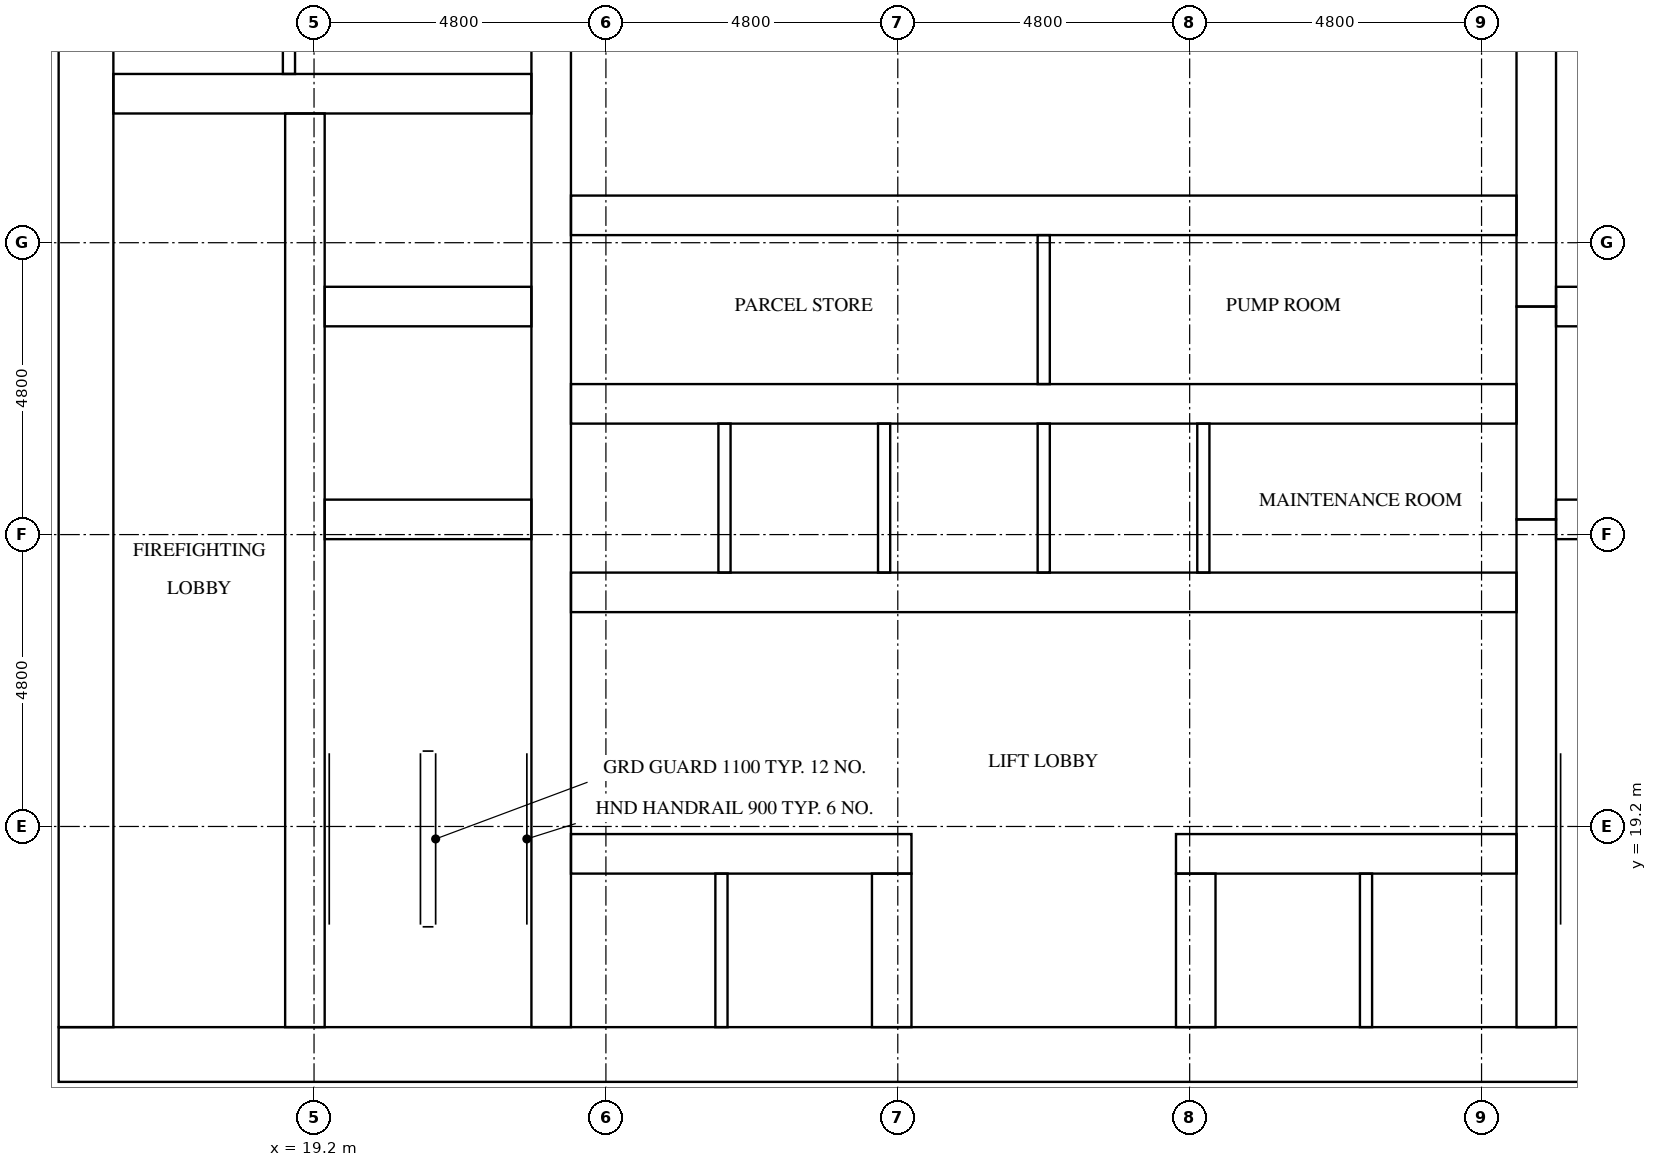
"""IFC4 building model, lengths in metres.
Left out: names, types, materials, properties, quantities, classifications, styles, units other than length and angle.
Written with IfcOpenShell. Run it as: python <this file> out.ifc"""

import sys

from ifc_helpers import new_model, si_unit, direction, frame, frame_2d, origin, place, context, subcontext, project, spatial, rectangle, extrude, element, fill, save


model = new_model("IFC4")
c1 = context("Model", 3, precision=1e-05, world=origin(), true_north=direction((0.0, 1.0)))
c2 = subcontext(c1, "Body", "Model", "MODEL_VIEW")
j1 = project(units=[si_unit("LENGTHUNIT", "METRE"), si_unit("PLANEANGLEUNIT", "RADIAN")], contexts=[c1])
p1 = place(None, origin())
s1 = spatial("IfcSite", under=j1, at=p1, CompositionType="ELEMENT")
p2 = place(p1, origin())
s2 = spatial("IfcBuilding", under=s1, at=p2, CompositionType="ELEMENT")
p3 = place(p2, frame((0.0, 0.0, 62.8)))
s3 = spatial("IfcBuildingStorey", under=s2, at=p3, CompositionType="ELEMENT", Elevation=62.8)
p4 = place(p3, frame((15.0, 15.45, 0.0), z_axis=(0.0, 0.0, 1.0), x_axis=(1.0, 0.0, 0.0)))
e1 = element("IfcWall", 1, at=p4, inside=s3, PredefinedType="SHEAR", context=c2, shape_type="SweptSolid", body=[
    extrude(rectangle(XDim=32.4, YDim=0.9, at=frame_2d((16.2, 0.0))), origin(), (0.0, 0.0, 1.0), 3.2),
])
p5 = place(p4, frame((15.3, 0.0, 0.0)))
e2 = element("IfcOpeningElement", 2, at=p5, cuts=e1, PredefinedType="OPENING", context=c2, shape_type="SweptSolid", body=[
    extrude(rectangle(XDim=1.8, YDim=2.1, at=frame_2d((0.9, 1.05))), frame((0.0, 0.46, 0.0), z_axis=(0.0, -1.0, 0.0), x_axis=(1.0, 0.0, 0.0)), (0.0, 0.0, 1.0), 0.92),
])
p6 = place(p3, frame((15.45, 15.9, 0.0), z_axis=(0.0, 0.0, 1.0), x_axis=(0.0, 1.0, 0.0)))
e3 = element("IfcWall", 3, at=p6, inside=s3, PredefinedType="SHEAR", context=c2, shape_type="SweptSolid", body=[
    extrude(rectangle(XDim=21.0, YDim=0.9, at=frame_2d((10.5, 0.0))), origin(), (0.0, 0.0, 1.0), 3.2),
])
p7 = place(p6, frame((4.86, 0.0, 0.0)))
e4 = element("IfcOpeningElement", 4, at=p7, cuts=e3, PredefinedType="OPENING", context=c2, shape_type="SweptSolid", body=[
    extrude(rectangle(XDim=1.2, YDim=2.1, at=frame_2d((0.6, 1.05))), frame((0.0, 0.46, 0.0), z_axis=(0.0, -1.0, 0.0), x_axis=(1.0, 0.0, 0.0)), (0.0, 0.0, 1.0), 0.92),
])
p8 = place(p3, frame((19.05, 15.9, 0.0), z_axis=(0.0, 0.0, 1.0), x_axis=(0.0, 1.0, 0.0)))
e5 = element("IfcWall", 5, at=p8, inside=s3, PredefinedType="SHEAR", context=c2, shape_type="SweptSolid", body=[
    extrude(rectangle(XDim=15.025, YDim=0.65, at=frame_2d((7.513, 0.0))), origin(), (0.0, 0.0, 1.0), 3.2),
])
p9 = place(p8, frame((9.55, 0.0, 0.0)))
e6 = element("IfcOpeningElement", 6, at=p9, cuts=e5, PredefinedType="OPENING", context=c2, shape_type="SweptSolid", body=[
    extrude(rectangle(XDim=1.1, YDim=2.1, at=frame_2d((0.55, 1.05))), frame((0.0, 0.335, 0.0), z_axis=(0.0, -1.0, 0.0), x_axis=(1.0, 0.0, 0.0)), (0.0, 0.0, 1.0), 0.67),
])
p10 = place(p8, frame((13.05, 0.0, 0.0)))
e7 = element("IfcOpeningElement", 7, at=p10, cuts=e5, PredefinedType="OPENING", context=c2, shape_type="SweptSolid", body=[
    extrude(rectangle(XDim=1.1, YDim=2.1, at=frame_2d((0.55, 1.05))), frame((0.0, 0.335, 0.0), z_axis=(0.0, -1.0, 0.0), x_axis=(1.0, 0.0, 0.0)), (0.0, 0.0, 1.0), 0.67),
])
p11 = place(p8, frame((0.3, 0.0, 0.0)))
e8 = element("IfcOpeningElement", 8, at=p11, cuts=e5, PredefinedType="OPENING", context=c2, shape_type="SweptSolid", body=[
    extrude(rectangle(XDim=1.2, YDim=2.1, at=frame_2d((0.6, 1.05))), frame((0.0, 0.335, 0.0), z_axis=(0.0, -1.0, 0.0), x_axis=(1.0, 0.0, 0.0)), (0.0, 0.0, 1.0), 0.67),
])
p12 = place(p3, frame((23.1, 15.9, 0.0), z_axis=(0.0, 0.0, 1.0), x_axis=(0.0, 1.0, 0.0)))
e9 = element("IfcWall", 9, at=p12, inside=s3, PredefinedType="SHEAR", context=c2, shape_type="SweptSolid", body=[
    extrude(rectangle(XDim=21.0, YDim=0.65, at=frame_2d((10.5, 0.0))), origin(), (0.0, 0.0, 1.0), 3.2),
])
p13 = place(p3, frame((39.3, 15.9, 0.0), z_axis=(0.0, 0.0, 1.0), x_axis=(0.0, 1.0, 0.0)))
e10 = element("IfcWall", 10, at=p13, inside=s3, PredefinedType="SHEAR", context=c2, shape_type="SweptSolid", body=[
    extrude(rectangle(XDim=8.35, YDim=0.65, at=frame_2d((4.175, 0.0))), origin(), (0.0, 0.0, 1.0), 3.2),
])
p14 = place(p3, frame((39.3, 24.25, 0.0), z_axis=(0.0, 0.0, 1.0), x_axis=(0.0, 1.0, 0.0)))
e11 = element("IfcWall", 11, at=p14, inside=s3, PredefinedType="SHEAR", context=c2, shape_type="SweptSolid", body=[
    extrude(rectangle(XDim=3.5, YDim=0.65, at=frame_2d((1.75, 0.0))), origin(), (0.0, 0.0, 1.0), 3.2),
])
p15 = place(p3, frame((39.3, 27.75, 0.0), z_axis=(0.0, 0.0, 1.0), x_axis=(0.0, 1.0, 0.0)))
e12 = element("IfcWall", 12, at=p15, inside=s3, PredefinedType="SHEAR", context=c2, shape_type="SweptSolid", body=[
    extrude(rectangle(XDim=9.15, YDim=0.65, at=frame_2d((4.575, 0.0))), origin(), (0.0, 0.0, 1.0), 3.2),
])
for number, where, z_axis, x_axis in (
    (13, (19.375, 24.25, 0.0), (0.0, 0.0, 1.0), (1.0, 0.0, 0.0)),
    (14, (19.375, 27.75, 0.0), (0.0, 0.0, 1.0), (1.0, 0.0, 0.0)),
):
    element("IfcWall", number, at=place(p3, frame(where, z_axis=z_axis, x_axis=x_axis)), inside=s3, PredefinedType="SHEAR", context=c2, shape_type="SweptSolid", body=[
        extrude(rectangle(XDim=3.4, YDim=0.65, at=frame_2d((1.7, 0.0))), origin(), (0.0, 0.0, 1.0), 3.2),
    ])
p16 = place(p3, frame((15.9, 31.25, 0.0), z_axis=(0.0, 0.0, 1.0), x_axis=(1.0, 0.0, 0.0)))
e15 = element("IfcWall", 15, at=p16, inside=s3, PredefinedType="SHEAR", context=c2, shape_type="SweptSolid", body=[
    extrude(rectangle(XDim=6.875, YDim=0.65, at=frame_2d((3.438, 0.0))), origin(), (0.0, 0.0, 1.0), 3.2),
])
for number, where, z_axis, x_axis in (
    (16, (39.625, 24.25, 0.0), (0.0, 0.0, 1.0), (1.0, 0.0, 0.0)),
    (17, (39.625, 27.75, 0.0), (0.0, 0.0, 1.0), (1.0, 0.0, 0.0)),
):
    element("IfcWall", number, at=place(p3, frame(where, z_axis=z_axis, x_axis=x_axis)), inside=s3, PredefinedType="SHEAR", context=c2, shape_type="SweptSolid", body=[
        extrude(rectangle(XDim=3.4, YDim=0.65, at=frame_2d((1.7, 0.0))), origin(), (0.0, 0.0, 1.0), 3.2),
    ])
p17 = place(p3, frame((23.425, 18.75, 0.0), z_axis=(0.0, 0.0, 1.0), x_axis=(1.0, 0.0, 0.0)))
e18 = element("IfcWall", 18, at=p17, inside=s3, PredefinedType="SHEAR", context=c2, shape_type="SweptSolid", body=[
    extrude(rectangle(XDim=5.6, YDim=0.65, at=frame_2d((2.8, 0.0))), origin(), (0.0, 0.0, 1.0), 3.2),
])
p18 = place(p17, frame((0.637, 0.0, 0.0)))
e19 = element("IfcOpeningElement", 19, at=p18, cuts=e18, PredefinedType="OPENING", context=c2, shape_type="SweptSolid", body=[
    extrude(rectangle(XDim=1.1, YDim=2.1, at=frame_2d((0.55, 1.05))), frame((0.0, 0.335, 0.0), z_axis=(0.0, -1.0, 0.0), x_axis=(1.0, 0.0, 0.0)), (0.0, 0.0, 1.0), 0.67),
])
p19 = place(p17, frame((3.212, 0.0, 0.0)))
e20 = element("IfcOpeningElement", 20, at=p19, cuts=e18, PredefinedType="OPENING", context=c2, shape_type="SweptSolid", body=[
    extrude(rectangle(XDim=1.1, YDim=2.1, at=frame_2d((0.55, 1.05))), frame((0.0, 0.335, 0.0), z_axis=(0.0, -1.0, 0.0), x_axis=(1.0, 0.0, 0.0)), (0.0, 0.0, 1.0), 0.67),
])
p20 = place(p3, frame((33.375, 18.75, 0.0), z_axis=(0.0, 0.0, 1.0), x_axis=(1.0, 0.0, 0.0)))
e21 = element("IfcWall", 21, at=p20, inside=s3, PredefinedType="SHEAR", context=c2, shape_type="SweptSolid", body=[
    extrude(rectangle(XDim=5.6, YDim=0.65, at=frame_2d((2.8, 0.0))), origin(), (0.0, 0.0, 1.0), 3.2),
])
p21 = place(p20, frame((1.288, 0.0, 0.0)))
e22 = element("IfcOpeningElement", 22, at=p21, cuts=e21, PredefinedType="OPENING", context=c2, shape_type="SweptSolid", body=[
    extrude(rectangle(XDim=1.1, YDim=2.1, at=frame_2d((0.55, 1.05))), frame((0.0, 0.335, 0.0), z_axis=(0.0, -1.0, 0.0), x_axis=(1.0, 0.0, 0.0)), (0.0, 0.0, 1.0), 0.67),
])
p22 = place(p20, frame((3.863, 0.0, 0.0)))
e23 = element("IfcOpeningElement", 23, at=p22, cuts=e21, PredefinedType="OPENING", context=c2, shape_type="SweptSolid", body=[
    extrude(rectangle(XDim=1.1, YDim=2.1, at=frame_2d((0.55, 1.05))), frame((0.0, 0.335, 0.0), z_axis=(0.0, -1.0, 0.0), x_axis=(1.0, 0.0, 0.0)), (0.0, 0.0, 1.0), 0.67),
])
p23 = place(p3, frame((23.425, 23.05, 0.0), z_axis=(0.0, 0.0, 1.0), x_axis=(1.0, 0.0, 0.0)))
e24 = element("IfcWall", 24, at=p23, inside=s3, PredefinedType="SHEAR", context=c2, shape_type="SweptSolid", body=[
    extrude(rectangle(XDim=15.55, YDim=0.65, at=frame_2d((7.775, 0.0))), origin(), (0.0, 0.0, 1.0), 3.2),
])
p24 = place(p23, frame((0.663, 0.0, 0.0)))
e25 = element("IfcOpeningElement", 25, at=p24, cuts=e24, PredefinedType="OPENING", context=c2, shape_type="SweptSolid", body=[
    extrude(rectangle(XDim=1.1, YDim=2.1, at=frame_2d((0.55, 1.05))), frame((0.0, 0.335, 0.0), z_axis=(0.0, -1.0, 0.0), x_axis=(1.0, 0.0, 0.0)), (0.0, 0.0, 1.0), 0.67),
])
p25 = place(p23, frame((3.288, 0.0, 0.0)))
e26 = element("IfcOpeningElement", 26, at=p25, cuts=e24, PredefinedType="OPENING", context=c2, shape_type="SweptSolid", body=[
    extrude(rectangle(XDim=1.1, YDim=2.1, at=frame_2d((0.55, 1.05))), frame((0.0, 0.335, 0.0), z_axis=(0.0, -1.0, 0.0), x_axis=(1.0, 0.0, 0.0)), (0.0, 0.0, 1.0), 0.67),
])
p26 = place(p23, frame((12.525, 0.0, 0.0)))
e27 = element("IfcOpeningElement", 27, at=p26, cuts=e24, PredefinedType="OPENING", context=c2, shape_type="SweptSolid", body=[
    extrude(rectangle(XDim=1.0, YDim=2.1, at=frame_2d((0.5, 1.05))), frame((0.0, 0.335, 0.0), z_axis=(0.0, -1.0, 0.0), x_axis=(1.0, 0.0, 0.0)), (0.0, 0.0, 1.0), 0.67),
])
p27 = place(p3, frame((23.425, 26.15, 0.0), z_axis=(0.0, 0.0, 1.0), x_axis=(1.0, 0.0, 0.0)))
e28 = element("IfcWall", 28, at=p27, inside=s3, PredefinedType="SHEAR", context=c2, shape_type="SweptSolid", body=[
    extrude(rectangle(XDim=15.55, YDim=0.65, at=frame_2d((7.775, 0.0))), origin(), (0.0, 0.0, 1.0), 3.2),
])
p28 = place(p3, frame((23.425, 29.25, 0.0), z_axis=(0.0, 0.0, 1.0), x_axis=(1.0, 0.0, 0.0)))
e29 = element("IfcWall", 29, at=p28, inside=s3, PredefinedType="SHEAR", context=c2, shape_type="SweptSolid", body=[
    extrude(rectangle(XDim=15.55, YDim=0.65, at=frame_2d((7.775, 0.0))), origin(), (0.0, 0.0, 1.0), 3.2),
])
p29 = place(p28, frame((3.337, 0.0, 0.0)))
e30 = element("IfcOpeningElement", 30, at=p29, cuts=e29, PredefinedType="OPENING", context=c2, shape_type="SweptSolid", body=[
    extrude(rectangle(XDim=1.0, YDim=2.1, at=frame_2d((0.5, 1.05))), frame((0.0, 0.335, 0.0), z_axis=(0.0, -1.0, 0.0), x_axis=(1.0, 0.0, 0.0)), (0.0, 0.0, 1.0), 0.67),
])
p30 = place(p28, frame((11.212, 0.0, 0.0)))
e31 = element("IfcOpeningElement", 31, at=p30, cuts=e29, PredefinedType="OPENING", context=c2, shape_type="SweptSolid", body=[
    extrude(rectangle(XDim=1.0, YDim=2.1, at=frame_2d((0.5, 1.05))), frame((0.0, 0.335, 0.0), z_axis=(0.0, -1.0, 0.0), x_axis=(1.0, 0.0, 0.0)), (0.0, 0.0, 1.0), 0.67),
])
for number, where, z_axis, x_axis in (
    (32, (28.7, 15.9, 0.0), (0.0, 0.0, 1.0), (0.0, 1.0, 0.0)),
    (33, (33.7, 15.9, 0.0), (0.0, 0.0, 1.0), (0.0, 1.0, 0.0)),
):
    element("IfcWall", number, at=place(p3, frame(where, z_axis=z_axis, x_axis=x_axis)), inside=s3, PredefinedType="SHEAR", context=c2, shape_type="SweptSolid", body=[
        extrude(rectangle(XDim=2.525, YDim=0.65, at=frame_2d((1.263, 0.0))), origin(), (0.0, 0.0, 1.0), 3.2),
    ])
for number, where, z_axis, x_axis in (
    (34, (25.95, 23.375, 0.0), (0.0, 0.0, 1.0), (0.0, 1.0, 0.0)),
    (35, (28.575, 23.375, 0.0), (0.0, 0.0, 1.0), (0.0, 1.0, 0.0)),
    (36, (31.2, 23.375, 0.0), (0.0, 0.0, 1.0), (0.0, 1.0, 0.0)),
    (37, (33.825, 23.375, 0.0), (0.0, 0.0, 1.0), (0.0, 1.0, 0.0)),
):
    element("IfcWall", number, at=place(p3, frame(where, z_axis=z_axis, x_axis=x_axis)), inside=s3, PredefinedType="SOLIDWALL", context=c2, shape_type="SweptSolid", body=[
        extrude(rectangle(XDim=2.45, YDim=0.2, at=frame_2d((1.225, 0.0))), origin(), (0.0, 0.0, 1.0), 3.2),
    ])
for number, where, z_axis, x_axis in (
    (38, (25.9, 15.9, 0.0), (0.0, 0.0, 1.0), (0.0, 1.0, 0.0)),
    (39, (36.5, 15.9, 0.0), (0.0, 0.0, 1.0), (0.0, 1.0, 0.0)),
):
    element("IfcWall", number, at=place(p3, frame(where, z_axis=z_axis, x_axis=x_axis)), inside=s3, PredefinedType="SOLIDWALL", context=c2, shape_type="SweptSolid", body=[
        extrude(rectangle(XDim=2.525, YDim=0.2, at=frame_2d((1.263, 0.0))), origin(), (0.0, 0.0, 1.0), 3.2),
    ])
p31 = place(p3, frame((18.788, 31.575, 0.0), z_axis=(0.0, 0.0, 1.0), x_axis=(0.0, 1.0, 0.0)))
e40 = element("IfcWall", 40, at=p31, inside=s3, PredefinedType="PARTITIONING", context=c2, shape_type="SweptSolid", body=[
    extrude(rectangle(XDim=5.325, YDim=0.2, at=frame_2d((2.663, 0.0))), origin(), (0.0, 0.0, 1.0), 3.2),
])
p32 = place(p3, frame((31.2, 26.475, 0.0), z_axis=(0.0, 0.0, 1.0), x_axis=(0.0, 1.0, 0.0)))
e41 = element("IfcWall", 41, at=p32, inside=s3, PredefinedType="PARTITIONING", context=c2, shape_type="SweptSolid", body=[
    extrude(rectangle(XDim=2.45, YDim=0.2, at=frame_2d((1.225, 0.0))), origin(), (0.0, 0.0, 1.0), 3.2),
])
p33 = place(p18, origin())
e42 = element("IfcDoor", 42, at=p33, inside=s3, OperationType="DOUBLE_DOOR_SLIDING", PredefinedType="DOOR", context=c2, shape_type="SweptSolid", body=[
    extrude(rectangle(XDim=1.1, YDim=2.1, at=frame_2d((0.55, 1.05))), frame((0.0, 0.025, 0.0), z_axis=(0.0, -1.0, 0.0), x_axis=(1.0, 0.0, 0.0)), (0.0, 0.0, 1.0), 0.05),
])
fill(e19, e42)
p34 = place(p19, origin())
e43 = element("IfcDoor", 43, at=p34, inside=s3, OperationType="DOUBLE_DOOR_SLIDING", PredefinedType="DOOR", context=c2, shape_type="SweptSolid", body=[
    extrude(rectangle(XDim=1.1, YDim=2.1, at=frame_2d((0.55, 1.05))), frame((0.0, 0.025, 0.0), z_axis=(0.0, -1.0, 0.0), x_axis=(1.0, 0.0, 0.0)), (0.0, 0.0, 1.0), 0.05),
])
fill(e20, e43)
p35 = place(p21, origin())
e44 = element("IfcDoor", 44, at=p35, inside=s3, OperationType="DOUBLE_DOOR_SLIDING", PredefinedType="DOOR", context=c2, shape_type="SweptSolid", body=[
    extrude(rectangle(XDim=1.1, YDim=2.1, at=frame_2d((0.55, 1.05))), frame((0.0, 0.025, 0.0), z_axis=(0.0, -1.0, 0.0), x_axis=(1.0, 0.0, 0.0)), (0.0, 0.0, 1.0), 0.05),
])
fill(e22, e44)
p36 = place(p22, origin())
e45 = element("IfcDoor", 45, at=p36, inside=s3, OperationType="DOUBLE_DOOR_SLIDING", PredefinedType="DOOR", context=c2, shape_type="SweptSolid", body=[
    extrude(rectangle(XDim=1.1, YDim=2.1, at=frame_2d((0.55, 1.05))), frame((0.0, 0.025, 0.0), z_axis=(0.0, -1.0, 0.0), x_axis=(1.0, 0.0, 0.0)), (0.0, 0.0, 1.0), 0.05),
])
fill(e23, e45)
p37 = place(p24, origin())
e46 = element("IfcDoor", 46, at=p37, inside=s3, OperationType="DOUBLE_DOOR_SLIDING", PredefinedType="DOOR", context=c2, shape_type="SweptSolid", body=[
    extrude(rectangle(XDim=1.1, YDim=2.1, at=frame_2d((0.55, 1.05))), frame((0.0, 0.025, 0.0), z_axis=(0.0, -1.0, 0.0), x_axis=(1.0, 0.0, 0.0)), (0.0, 0.0, 1.0), 0.05),
])
fill(e25, e46)
p38 = place(p25, origin())
e47 = element("IfcDoor", 47, at=p38, inside=s3, OperationType="DOUBLE_DOOR_SLIDING", PredefinedType="DOOR", context=c2, shape_type="SweptSolid", body=[
    extrude(rectangle(XDim=1.1, YDim=2.1, at=frame_2d((0.55, 1.05))), frame((0.0, 0.025, 0.0), z_axis=(0.0, -1.0, 0.0), x_axis=(1.0, 0.0, 0.0)), (0.0, 0.0, 1.0), 0.05),
])
fill(e26, e47)
p39 = place(p9, origin())
e48 = element("IfcDoor", 48, at=p39, inside=s3, OperationType="DOUBLE_DOOR_SLIDING", PredefinedType="DOOR", context=c2, shape_type="SweptSolid", body=[
    extrude(rectangle(XDim=1.1, YDim=2.1, at=frame_2d((0.55, 1.05))), frame((0.0, 0.025, 0.0), z_axis=(0.0, -1.0, 0.0), x_axis=(1.0, 0.0, 0.0)), (0.0, 0.0, 1.0), 0.05),
])
fill(e6, e48)
p40 = place(p10, origin())
e49 = element("IfcDoor", 49, at=p40, inside=s3, OperationType="DOUBLE_DOOR_SLIDING", PredefinedType="DOOR", context=c2, shape_type="SweptSolid", body=[
    extrude(rectangle(XDim=1.1, YDim=2.1, at=frame_2d((0.55, 1.05))), frame((0.0, 0.025, 0.0), z_axis=(0.0, -1.0, 0.0), x_axis=(1.0, 0.0, 0.0)), (0.0, 0.0, 1.0), 0.05),
])
fill(e7, e49)
p41 = place(p11, frame((1.2, 0.0, 0.0), z_axis=(0.0, 0.0, 1.0), x_axis=(-1.0, 0.0, 0.0)))
e50 = element("IfcDoor", 50, at=p41, inside=s3, OperationType="SINGLE_SWING_LEFT", PredefinedType="DOOR", context=c2, shape_type="SweptSolid", body=[
    extrude(rectangle(XDim=1.2, YDim=2.1, at=frame_2d((0.6, 1.05))), frame((0.0, 0.025, 0.0), z_axis=(0.0, -1.0, 0.0), x_axis=(1.0, 0.0, 0.0)), (0.0, 0.0, 1.0), 0.05),
])
fill(e8, e50)
p42 = place(p5, frame((1.8, 0.0, 0.0), z_axis=(0.0, 0.0, 1.0), x_axis=(-1.0, 0.0, 0.0)))
e51 = element("IfcDoor", 51, at=p42, inside=s3, OperationType="DOUBLE_DOOR_SINGLE_SWING", PredefinedType="DOOR", context=c2, shape_type="SweptSolid", body=[
    extrude(rectangle(XDim=1.8, YDim=2.1, at=frame_2d((0.9, 1.05))), frame((0.0, 0.025, 0.0), z_axis=(0.0, -1.0, 0.0), x_axis=(1.0, 0.0, 0.0)), (0.0, 0.0, 1.0), 0.05),
])
fill(e2, e51)
p43 = place(p7, frame((1.2, 0.0, 0.0), z_axis=(0.0, 0.0, 1.0), x_axis=(-1.0, 0.0, 0.0)))
e52 = element("IfcDoor", 52, at=p43, inside=s3, OperationType="SINGLE_SWING_RIGHT", PredefinedType="DOOR", context=c2, shape_type="SweptSolid", body=[
    extrude(rectangle(XDim=1.2, YDim=2.1, at=frame_2d((0.6, 1.05))), frame((0.0, 0.025, 0.0), z_axis=(0.0, -1.0, 0.0), x_axis=(1.0, 0.0, 0.0)), (0.0, 0.0, 1.0), 0.05),
])
fill(e4, e52)
p44 = place(p26, frame((1.0, 0.0, 0.0), z_axis=(0.0, 0.0, 1.0), x_axis=(-1.0, 0.0, 0.0)))
e53 = element("IfcDoor", 53, at=p44, inside=s3, OperationType="SINGLE_SWING_RIGHT", PredefinedType="DOOR", context=c2, shape_type="SweptSolid", body=[
    extrude(rectangle(XDim=1.0, YDim=2.1, at=frame_2d((0.5, 1.05))), frame((0.0, 0.025, 0.0), z_axis=(0.0, -1.0, 0.0), x_axis=(1.0, 0.0, 0.0)), (0.0, 0.0, 1.0), 0.05),
])
fill(e27, e53)
p45 = place(p29, origin())
e54 = element("IfcDoor", 54, at=p45, inside=s3, OperationType="SINGLE_SWING_LEFT", PredefinedType="DOOR", context=c2, shape_type="SweptSolid", body=[
    extrude(rectangle(XDim=1.0, YDim=2.1, at=frame_2d((0.5, 1.05))), frame((0.0, 0.025, 0.0), z_axis=(0.0, -1.0, 0.0), x_axis=(1.0, 0.0, 0.0)), (0.0, 0.0, 1.0), 0.05),
])
fill(e30, e54)
p46 = place(p30, origin())
e55 = element("IfcDoor", 55, at=p46, inside=s3, OperationType="SINGLE_SWING_RIGHT", PredefinedType="DOOR", context=c2, shape_type="SweptSolid", body=[
    extrude(rectangle(XDim=1.0, YDim=2.1, at=frame_2d((0.5, 1.05))), frame((0.0, 0.025, 0.0), z_axis=(0.0, -1.0, 0.0), x_axis=(1.0, 0.0, 0.0)), (0.0, 0.0, 1.0), 0.05),
])
fill(e31, e55)
save(model, sys.argv[1])
